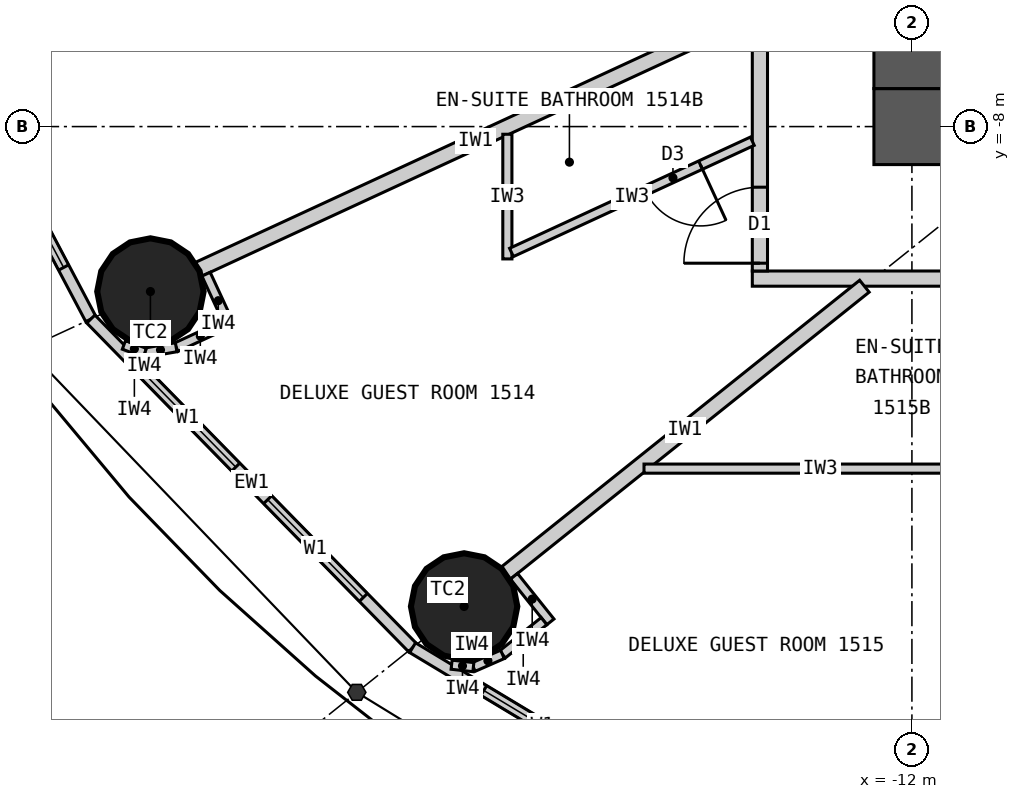
"""IFC4 building model, lengths in metres.
Left out: names, types, materials, properties, quantities, classifications, styles, units other than length and angle.
Written with IfcOpenShell. Run it as: python <this file> out.ifc"""

import sys

from ifc_helpers import new_model, si_unit, direction, frame, frame_2d, origin, origin_2d, place, context, subcontext, project, spatial, rectangle, circle, extrude, element, fill, save


model = new_model("IFC4")
c1 = context("Model", 3, precision=1e-05, world=origin(), true_north=direction((0.0, 1.0)))
c2 = subcontext(c1, "Body", "Model", "MODEL_VIEW")
j1 = project(units=[si_unit("LENGTHUNIT", "METRE"), si_unit("PLANEANGLEUNIT", "RADIAN")], contexts=[c1])
p1 = place(None, origin())
s1 = spatial("IfcSite", under=j1, at=p1, CompositionType="ELEMENT")
p2 = place(p1, origin())
s2 = spatial("IfcBuilding", under=s1, at=p2, CompositionType="ELEMENT")
p3 = place(p2, frame((0.0, 0.0, 63.9)))
s3 = spatial("IfcBuildingStorey", under=s2, at=p3, CompositionType="ELEMENT", Elevation=63.9)
for number, where, z_axis, x_axis in (
    (1, (-22.019, -10.17, 0.0), (0.0, 0.0, 1.0), (1.0, 0.0, 0.0)),
    (2, (-17.892, -14.313, 0.0), (0.0, 0.0, 1.0), (1.0, 0.0, 0.0)),
):
    element("IfcColumn", number, at=place(p3, frame(where, z_axis=z_axis, x_axis=x_axis)), inside=s3, PredefinedType="COLUMN", context=c2, shape_type="SweptSolid", body=[
        extrude(circle(Radius=0.7, at=origin_2d()), origin(), (0.0, 0.0, 1.0), 3.3),
    ])
p4 = place(p3, frame((12.5, -8.0, 0.0), z_axis=(0.0, 0.0, 1.0), x_axis=(-1.0, 0.0, 0.0)))
e3 = element("IfcWall", 3, at=p4, inside=s3, PredefinedType="SHEAR", context=c2, shape_type="SweptSolid", body=[
    extrude(rectangle(XDim=25.0, YDim=1.0, at=frame_2d((12.5, 0.0))), origin(), (0.0, 0.0, 1.0), 3.3),
])
p5 = place(p4, frame((11.2, 0.0, 0.0)))
e4 = element("IfcOpeningElement", 4, at=p5, cuts=e3, PredefinedType="OPENING", context=c2, shape_type="SweptSolid", body=[
    extrude(rectangle(XDim=1.2, YDim=2.2, at=frame_2d((0.6, 1.1))), frame((0.0, 0.51, 0.0), z_axis=(0.0, -1.0, 0.0), x_axis=(1.0, 0.0, 0.0)), (0.0, 0.0, 1.0), 1.02),
])
p6 = place(p4, frame((18.8, 0.0, 0.0)))
e5 = element("IfcOpeningElement", 5, at=p6, cuts=e3, PredefinedType="OPENING", context=c2, shape_type="SweptSolid", body=[
    extrude(rectangle(XDim=0.9, YDim=2.2, at=frame_2d((0.45, 1.1))), frame((0.0, 0.51, 0.0), z_axis=(0.0, -1.0, 0.0), x_axis=(1.0, 0.0, 0.0)), (0.0, 0.0, 1.0), 1.02),
])
p7 = place(p3, frame((-12.0, 7.5, 0.0), z_axis=(0.0, 0.0, 1.0), x_axis=(0.0, -1.0, 0.0)))
e6 = element("IfcWall", 6, at=p7, inside=s3, PredefinedType="SHEAR", context=c2, shape_type="SweptSolid", body=[
    extrude(rectangle(XDim=15.0, YDim=1.0, at=frame_2d((7.5, 0.0))), origin(), (0.0, 0.0, 1.0), 3.3),
])
p8 = place(p7, frame((6.6, 0.0, 0.0)))
e7 = element("IfcOpeningElement", 7, at=p8, cuts=e6, PredefinedType="OPENING", context=c2, shape_type="SweptSolid", body=[
    extrude(rectangle(XDim=1.8, YDim=2.2, at=frame_2d((0.9, 1.1))), frame((0.0, 0.51, 0.0), z_axis=(0.0, -1.0, 0.0), x_axis=(1.0, 0.0, 0.0)), (0.0, 0.0, 1.0), 1.02),
])
p9 = place(p3, frame((-25.482, -5.462, 0.0), z_axis=(0.0, 0.0, 1.0), x_axis=(0.467296867008, -0.884100468321, 0.0)))
e8 = element("IfcWall", 8, at=p9, inside=s3, PredefinedType="ELEMENTEDWALL", context=c2, shape_type="SweptSolid", body=[
    extrude(rectangle(XDim=5.734, YDim=0.15, at=frame_2d((2.867, 0.0))), origin(), (0.0, 0.0, 1.0), 3.12),
])
p10 = place(p9, frame((0.767, 0.0, 0.9)))
e9 = element("IfcOpeningElement", 9, at=p10, cuts=e8, PredefinedType="OPENING", context=c2, shape_type="SweptSolid", body=[
    extrude(rectangle(XDim=1.8, YDim=1.9, at=frame_2d((0.9, 0.95))), frame((0.0, 0.085, 0.0), z_axis=(0.0, -1.0, 0.0), x_axis=(1.0, 0.0, 0.0)), (0.0, 0.0, 1.0), 0.17),
])
p11 = place(p9, frame((3.167, 0.0, 0.9)))
e10 = element("IfcOpeningElement", 10, at=p11, cuts=e8, PredefinedType="OPENING", context=c2, shape_type="SweptSolid", body=[
    extrude(rectangle(XDim=1.8, YDim=1.9, at=frame_2d((0.9, 0.95))), frame((0.0, 0.085, 0.0), z_axis=(0.0, -1.0, 0.0), x_axis=(1.0, 0.0, 0.0)), (0.0, 0.0, 1.0), 0.17),
])
p12 = place(p3, frame((-22.803, -10.532, 0.0), z_axis=(0.0, 0.0, 1.0), x_axis=(0.699602905915, -0.714531856557, 0.0)))
e11 = element("IfcWall", 11, at=p12, inside=s3, PredefinedType="ELEMENTEDWALL", context=c2, shape_type="SweptSolid", body=[
    extrude(rectangle(XDim=6.051, YDim=0.15, at=frame_2d((3.025, 0.0))), origin(), (0.0, 0.0, 1.0), 3.12),
])
p13 = place(p12, frame((0.926, 0.0, 0.9)))
e12 = element("IfcOpeningElement", 12, at=p13, cuts=e11, PredefinedType="OPENING", context=c2, shape_type="SweptSolid", body=[
    extrude(rectangle(XDim=1.8, YDim=1.9, at=frame_2d((0.9, 0.95))), frame((0.0, 0.085, 0.0), z_axis=(0.0, -1.0, 0.0), x_axis=(1.0, 0.0, 0.0)), (0.0, 0.0, 1.0), 0.17),
])
p14 = place(p12, frame((3.325, 0.0, 0.9)))
e13 = element("IfcOpeningElement", 13, at=p14, cuts=e11, PredefinedType="OPENING", context=c2, shape_type="SweptSolid", body=[
    extrude(rectangle(XDim=1.8, YDim=1.9, at=frame_2d((0.9, 0.95))), frame((0.0, 0.085, 0.0), z_axis=(0.0, -1.0, 0.0), x_axis=(1.0, 0.0, 0.0)), (0.0, 0.0, 1.0), 0.17),
])
p15 = place(p3, frame((-18.57, -14.856, 0.0), z_axis=(0.0, 0.0, 1.0), x_axis=(0.856983180864, -0.515344377787, 0.0)))
e14 = element("IfcWall", 14, at=p15, inside=s3, PredefinedType="ELEMENTEDWALL", context=c2, shape_type="SweptSolid", body=[
    extrude(rectangle(XDim=6.386, YDim=0.15, at=frame_2d((3.193, 0.0))), origin(), (0.0, 0.0, 1.0), 3.12),
])
p16 = place(p15, frame((1.093, 0.0, 0.9)))
e15 = element("IfcOpeningElement", 15, at=p16, cuts=e14, PredefinedType="OPENING", context=c2, shape_type="SweptSolid", body=[
    extrude(rectangle(XDim=1.8, YDim=1.9, at=frame_2d((0.9, 0.95))), frame((0.0, 0.085, 0.0), z_axis=(0.0, -1.0, 0.0), x_axis=(1.0, 0.0, 0.0)), (0.0, 0.0, 1.0), 0.17),
])
p17 = place(p15, frame((3.493, 0.0, 0.9)))
e16 = element("IfcOpeningElement", 16, at=p17, cuts=e14, PredefinedType="OPENING", context=c2, shape_type="SweptSolid", body=[
    extrude(rectangle(XDim=1.8, YDim=1.9, at=frame_2d((0.9, 0.95))), frame((0.0, 0.085, 0.0), z_axis=(0.0, -1.0, 0.0), x_axis=(1.0, 0.0, 0.0)), (0.0, 0.0, 1.0), 0.17),
])
p18 = place(p3, frame((14.1, -10.0, 0.0), z_axis=(0.0, 0.0, 1.0), x_axis=(-1.0, 0.0, 0.0)))
e17 = element("IfcWall", 17, at=p18, inside=s3, PredefinedType="PARTITIONING", context=c2, shape_type="SweptSolid", body=[
    extrude(rectangle(XDim=28.2, YDim=0.2, at=frame_2d((14.1, 0.0))), origin(), (0.0, 0.0, 1.0), 3.12),
])
p19 = place(p18, frame((23.865, 0.0, 0.0)))
e18 = element("IfcOpeningElement", 18, at=p19, cuts=e17, PredefinedType="OPENING", context=c2, shape_type="SweptSolid", body=[
    extrude(rectangle(XDim=1.0, YDim=2.2, at=frame_2d((0.5, 1.1))), frame((0.0, 0.11, 0.0), z_axis=(0.0, -1.0, 0.0), x_axis=(1.0, 0.0, 0.0)), (0.0, 0.0, 1.0), 0.22),
])
p20 = place(p18, frame((18.529, 0.0, 0.0)))
e19 = element("IfcOpeningElement", 19, at=p20, cuts=e17, PredefinedType="OPENING", context=c2, shape_type="SweptSolid", body=[
    extrude(rectangle(XDim=1.0, YDim=2.2, at=frame_2d((0.5, 1.1))), frame((0.0, 0.11, 0.0), z_axis=(0.0, -1.0, 0.0), x_axis=(1.0, 0.0, 0.0)), (0.0, 0.0, 1.0), 0.22),
])
p21 = place(p18, frame((14.623, 0.0, 0.0)))
e20 = element("IfcOpeningElement", 20, at=p21, cuts=e17, PredefinedType="OPENING", context=c2, shape_type="SweptSolid", body=[
    extrude(rectangle(XDim=1.0, YDim=2.2, at=frame_2d((0.5, 1.1))), frame((0.0, 0.11, 0.0), z_axis=(0.0, -1.0, 0.0), x_axis=(1.0, 0.0, 0.0)), (0.0, 0.0, 1.0), 0.22),
])
p22 = place(p18, frame((11.24, 0.0, 0.0)))
e21 = element("IfcOpeningElement", 21, at=p22, cuts=e17, PredefinedType="OPENING", context=c2, shape_type="SweptSolid", body=[
    extrude(rectangle(XDim=1.0, YDim=2.2, at=frame_2d((0.5, 1.1))), frame((0.0, 0.11, 0.0), z_axis=(0.0, -1.0, 0.0), x_axis=(1.0, 0.0, 0.0)), (0.0, 0.0, 1.0), 0.22),
])
p23 = place(p18, frame((8.671, 0.0, 0.0)))
e22 = element("IfcOpeningElement", 22, at=p23, cuts=e17, PredefinedType="OPENING", context=c2, shape_type="SweptSolid", body=[
    extrude(rectangle(XDim=1.0, YDim=2.2, at=frame_2d((0.5, 1.1))), frame((0.0, 0.11, 0.0), z_axis=(0.0, -1.0, 0.0), x_axis=(1.0, 0.0, 0.0)), (0.0, 0.0, 1.0), 0.22),
])
p24 = place(p18, frame((2.801, 0.0, 0.0)))
e23 = element("IfcOpeningElement", 23, at=p24, cuts=e17, PredefinedType="OPENING", context=c2, shape_type="SweptSolid", body=[
    extrude(rectangle(XDim=1.0, YDim=2.2, at=frame_2d((0.5, 1.1))), frame((0.0, 0.11, 0.0), z_axis=(0.0, -1.0, 0.0), x_axis=(1.0, 0.0, 0.0)), (0.0, 0.0, 1.0), 0.22),
])
p25 = place(p3, frame((-14.0, 9.9, 0.0), z_axis=(0.0, 0.0, 1.0), x_axis=(0.0, -1.0, 0.0)))
e24 = element("IfcWall", 24, at=p25, inside=s3, PredefinedType="PARTITIONING", context=c2, shape_type="SweptSolid", body=[
    extrude(rectangle(XDim=19.8, YDim=0.2, at=frame_2d((9.9, 0.0))), origin(), (0.0, 0.0, 1.0), 3.12),
])
p26 = place(p25, frame((0.103, 0.0, 0.0)))
e25 = element("IfcOpeningElement", 25, at=p26, cuts=e24, PredefinedType="OPENING", context=c2, shape_type="SweptSolid", body=[
    extrude(rectangle(XDim=1.0, YDim=2.2, at=frame_2d((0.5, 1.1))), frame((0.0, 0.11, 0.0), z_axis=(0.0, -1.0, 0.0), x_axis=(1.0, 0.0, 0.0)), (0.0, 0.0, 1.0), 0.22),
])
p27 = place(p25, frame((5.248, 0.0, 0.0)))
e26 = element("IfcOpeningElement", 26, at=p27, cuts=e24, PredefinedType="OPENING", context=c2, shape_type="SweptSolid", body=[
    extrude(rectangle(XDim=1.0, YDim=2.2, at=frame_2d((0.5, 1.1))), frame((0.0, 0.11, 0.0), z_axis=(0.0, -1.0, 0.0), x_axis=(1.0, 0.0, 0.0)), (0.0, 0.0, 1.0), 0.22),
])
p28 = place(p25, frame((9.438, 0.0, 0.0)))
e27 = element("IfcOpeningElement", 27, at=p28, cuts=e24, PredefinedType="OPENING", context=c2, shape_type="SweptSolid", body=[
    extrude(rectangle(XDim=1.0, YDim=2.2, at=frame_2d((0.5, 1.1))), frame((0.0, 0.11, 0.0), z_axis=(0.0, -1.0, 0.0), x_axis=(1.0, 0.0, 0.0)), (0.0, 0.0, 1.0), 0.22),
])
p29 = place(p25, frame((13.942, 0.0, 0.0)))
e28 = element("IfcOpeningElement", 28, at=p29, cuts=e24, PredefinedType="OPENING", context=c2, shape_type="SweptSolid", body=[
    extrude(rectangle(XDim=1.0, YDim=2.2, at=frame_2d((0.5, 1.1))), frame((0.0, 0.11, 0.0), z_axis=(0.0, -1.0, 0.0), x_axis=(1.0, 0.0, 0.0)), (0.0, 0.0, 1.0), 0.22),
])
p30 = place(p25, frame((18.698, 0.0, 0.0)))
e29 = element("IfcOpeningElement", 29, at=p30, cuts=e24, PredefinedType="OPENING", context=c2, shape_type="SweptSolid", body=[
    extrude(rectangle(XDim=1.0, YDim=2.2, at=frame_2d((0.5, 1.1))), frame((0.0, 0.11, 0.0), z_axis=(0.0, -1.0, 0.0), x_axis=(1.0, 0.0, 0.0)), (0.0, 0.0, 1.0), 0.22),
])
p31 = place(p3, frame((-14.1, -6.512, 0.0), z_axis=(0.0, 0.0, 1.0), x_axis=(-0.907832871056, -0.419332181247, 0.0)))
e30 = element("IfcWall", 30, at=p31, inside=s3, PredefinedType="PARTITIONING", context=c2, shape_type="SweptSolid", body=[
    extrude(rectangle(XDim=8.023, YDim=0.2, at=frame_2d((4.011, 0.0))), origin(), (0.0, 0.0, 1.0), 2.32),
])
p32 = place(p3, frame((-12.625, -10.1, 0.0), z_axis=(0.0, 0.0, 1.0), x_axis=(-0.780892451574, -0.624665493744, 0.0)))
e31 = element("IfcWall", 31, at=p32, inside=s3, PredefinedType="PARTITIONING", context=c2, shape_type="SweptSolid", body=[
    extrude(rectangle(XDim=6.045, YDim=0.2, at=frame_2d((3.022, 0.0))), origin(), (0.0, 0.0, 1.0), 2.32),
])
p33 = place(p3, frame((-7.289, -10.1, 0.0), z_axis=(0.0, 0.0, 1.0), x_axis=(-0.585198353053, -0.810890182197, 0.0)))
e32 = element("IfcWall", 32, at=p33, inside=s3, PredefinedType="PARTITIONING", context=c2, shape_type="SweptSolid", body=[
    extrude(rectangle(XDim=8.36, YDim=0.2, at=frame_2d((4.18, 0.0))), origin(), (0.0, 0.0, 1.0), 2.32),
])
p34 = place(p3, frame((-17.323, -8.101, 0.0), z_axis=(0.0, 0.0, 1.0), x_axis=(0.0, -1.0, 0.0)))
e33 = element("IfcWall", 33, at=p34, inside=s3, PredefinedType="PARTITIONING", context=c2, shape_type="SweptSolid", body=[
    extrude(rectangle(XDim=1.64, YDim=0.12, at=frame_2d((0.82, 0.0))), origin(), (0.0, 0.0, 1.0), 3.12),
])
p35 = place(p3, frame((-14.1, -8.193, 0.0), z_axis=(0.0, 0.0, 1.0), x_axis=(-0.907836493557, -0.419324338628, 0.0)))
e34 = element("IfcWall", 34, at=p35, inside=s3, PredefinedType="PARTITIONING", context=c2, shape_type="SweptSolid", body=[
    extrude(rectangle(XDim=3.49, YDim=0.12, at=frame_2d((1.745, 0.0))), origin(), (0.0, 0.0, 1.0), 3.12),
])
p36 = place(p35, frame((0.75, 0.0, 0.0)))
e35 = element("IfcOpeningElement", 35, at=p36, cuts=e34, PredefinedType="OPENING", context=c2, shape_type="SweptSolid", body=[
    extrude(rectangle(XDim=0.8, YDim=2.1, at=frame_2d((0.4, 1.05))), frame((0.0, 0.07, 0.0), z_axis=(0.0, -1.0, 0.0), x_axis=(1.0, 0.0, 0.0)), (0.0, 0.0, 1.0), 0.14),
])
p37 = place(p3, frame((-15.525, -12.5, 0.0), z_axis=(0.0, 0.0, 1.0), x_axis=(1.0, 0.0, 0.0)))
e36 = element("IfcWall", 36, at=p37, inside=s3, PredefinedType="PARTITIONING", context=c2, shape_type="SweptSolid", body=[
    extrude(rectangle(XDim=4.64, YDim=0.12, at=frame_2d((2.32, 0.0))), origin(), (0.0, 0.0, 1.0), 3.12),
])
p38 = place(p3, frame((-21.287, -9.942, 0.0), z_axis=(0.0, 0.0, 1.0), x_axis=(0.419259891039, -0.907866258744, 0.0)))
e37 = element("IfcWall", 37, at=p38, inside=s3, PredefinedType="PARTITIONING", context=c2, shape_type="SweptSolid", body=[
    extrude(rectangle(XDim=0.768, YDim=0.12, at=frame_2d((0.384, 0.0))), origin(), (0.0, 0.0, 1.0), 3.12),
])
p39 = place(p3, frame((-21.045, -10.61, 0.0), z_axis=(0.0, 0.0, 1.0), x_axis=(-0.907877701396, -0.419235112208, 0.0)))
e38 = element("IfcWall", 38, at=p39, inside=s3, PredefinedType="PARTITIONING", context=c2, shape_type="SweptSolid", body=[
    extrude(rectangle(XDim=0.7, YDim=0.12, at=frame_2d((0.35, 0.0))), origin(), (0.0, 0.0, 1.0), 3.12),
])
p40 = place(p3, frame((-21.68, -10.903, 0.0), z_axis=(0.0, 0.0, 1.0), x_axis=(-0.985446622073, -0.169985161247, 0.0)))
e39 = element("IfcWall", 39, at=p40, inside=s3, PredefinedType="PARTITIONING", context=c2, shape_type="SweptSolid", body=[
    extrude(rectangle(XDim=0.418, YDim=0.12, at=frame_2d((0.209, 0.0))), origin(), (0.0, 0.0, 1.0), 3.12),
])
p41 = place(p3, frame((-22.092, -10.974, 0.0), z_axis=(0.0, 0.0, 1.0), x_axis=(-0.938428160676, 0.345474437912, 0.0)))
e40 = element("IfcWall", 40, at=p41, inside=s3, PredefinedType="PARTITIONING", context=c2, shape_type="SweptSolid", body=[
    extrude(rectangle(XDim=0.294, YDim=0.12, at=frame_2d((0.147, 0.0))), origin(), (0.0, 0.0, 1.0), 3.12),
])
p42 = place(p3, frame((-17.236, -13.917, 0.0), z_axis=(0.0, 0.0, 1.0), x_axis=(0.624695047554, -0.780868809443, 0.0)))
e41 = element("IfcWall", 41, at=p42, inside=s3, PredefinedType="PARTITIONING", context=c2, shape_type="SweptSolid", body=[
    extrude(rectangle(XDim=0.768, YDim=0.12, at=frame_2d((0.384, 0.0))), origin(), (0.0, 0.0, 1.0), 3.12),
])
p43 = place(p3, frame((-16.841, -14.507, 0.0), z_axis=(0.0, 0.0, 1.0), x_axis=(-0.780902834923, -0.62465251333, 0.0)))
e42 = element("IfcWall", 42, at=p43, inside=s3, PredefinedType="PARTITIONING", context=c2, shape_type="SweptSolid", body=[
    extrude(rectangle(XDim=0.7, YDim=0.12, at=frame_2d((0.35, 0.0))), origin(), (0.0, 0.0, 1.0), 3.12),
])
p44 = place(p3, frame((-17.387, -14.944, 0.0), z_axis=(0.0, 0.0, 1.0), x_axis=(-0.916036698064, -0.401094462441, 0.0)))
e43 = element("IfcWall", 43, at=p44, inside=s3, PredefinedType="PARTITIONING", context=c2, shape_type="SweptSolid", body=[
    extrude(rectangle(XDim=0.418, YDim=0.12, at=frame_2d((0.209, 0.0))), origin(), (0.0, 0.0, 1.0), 3.12),
])
p45 = place(p3, frame((-17.77, -15.112, 0.0), z_axis=(0.0, 0.0, 1.0), x_axis=(-0.993904401174, 0.110245368731, 0.0)))
e44 = element("IfcWall", 44, at=p45, inside=s3, PredefinedType="PARTITIONING", context=c2, shape_type="SweptSolid", body=[
    extrude(rectangle(XDim=0.288, YDim=0.12, at=frame_2d((0.144, 0.0))), origin(), (0.0, 0.0, 1.0), 3.12),
])
p46 = place(p11, origin())
e45 = element("IfcWindow", 45, at=p46, inside=s3, PartitioningType="SINGLE_PANEL", PredefinedType="WINDOW", context=c2, shape_type="SweptSolid", body=[
    extrude(rectangle(XDim=1.8, YDim=1.9, at=frame_2d((0.9, 0.95))), frame((0.0, 0.03, 0.0), z_axis=(0.0, -1.0, 0.0), x_axis=(1.0, 0.0, 0.0)), (0.0, 0.0, 1.0), 0.06),
])
fill(e10, e45)
p47 = place(p13, origin())
e46 = element("IfcWindow", 46, at=p47, inside=s3, PartitioningType="SINGLE_PANEL", PredefinedType="WINDOW", context=c2, shape_type="SweptSolid", body=[
    extrude(rectangle(XDim=1.8, YDim=1.9, at=frame_2d((0.9, 0.95))), frame((0.0, 0.03, 0.0), z_axis=(0.0, -1.0, 0.0), x_axis=(1.0, 0.0, 0.0)), (0.0, 0.0, 1.0), 0.06),
])
fill(e12, e46)
p48 = place(p14, origin())
e47 = element("IfcWindow", 47, at=p48, inside=s3, PartitioningType="SINGLE_PANEL", PredefinedType="WINDOW", context=c2, shape_type="SweptSolid", body=[
    extrude(rectangle(XDim=1.8, YDim=1.9, at=frame_2d((0.9, 0.95))), frame((0.0, 0.03, 0.0), z_axis=(0.0, -1.0, 0.0), x_axis=(1.0, 0.0, 0.0)), (0.0, 0.0, 1.0), 0.06),
])
fill(e13, e47)
p49 = place(p16, origin())
e48 = element("IfcWindow", 48, at=p49, inside=s3, PartitioningType="SINGLE_PANEL", PredefinedType="WINDOW", context=c2, shape_type="SweptSolid", body=[
    extrude(rectangle(XDim=1.8, YDim=1.9, at=frame_2d((0.9, 0.95))), frame((0.0, 0.03, 0.0), z_axis=(0.0, -1.0, 0.0), x_axis=(1.0, 0.0, 0.0)), (0.0, 0.0, 1.0), 0.06),
])
fill(e15, e48)
p50 = place(p36, origin())
e49 = element("IfcDoor", 49, at=p50, inside=s3, OperationType="SINGLE_SWING_LEFT", PredefinedType="DOOR", context=c2, shape_type="SweptSolid", body=[
    extrude(rectangle(XDim=0.8, YDim=2.1, at=frame_2d((0.4, 1.05))), frame((0.0, 0.025, 0.0), z_axis=(0.0, -1.0, 0.0), x_axis=(1.0, 0.0, 0.0)), (0.0, 0.0, 1.0), 0.05),
])
fill(e35, e49)
p51 = place(p30, origin())
e50 = element("IfcDoor", 50, at=p51, inside=s3, OperationType="SINGLE_SWING_RIGHT", PredefinedType="DOOR", context=c2, shape_type="SweptSolid", body=[
    extrude(rectangle(XDim=1.0, YDim=2.2, at=frame_2d((0.5, 1.1))), frame((0.0, 0.025, 0.0), z_axis=(0.0, -1.0, 0.0), x_axis=(1.0, 0.0, 0.0)), (0.0, 0.0, 1.0), 0.05),
])
fill(e29, e50)
save(model, sys.argv[1])
